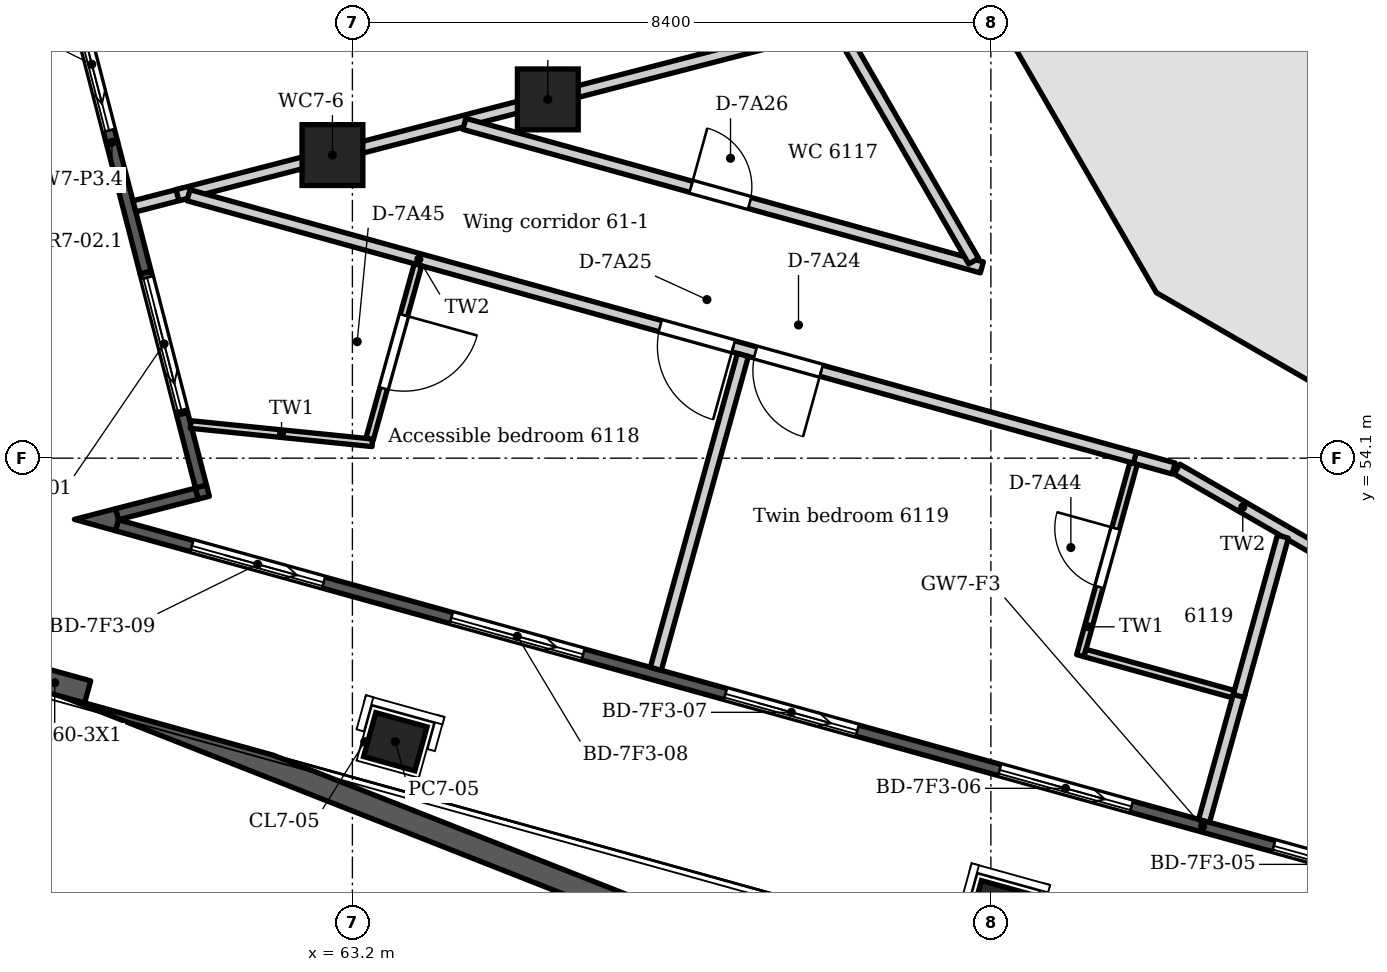
"""IFC4 building model, lengths in metres.
Left out: names, types, materials, properties, quantities, classifications, styles, units other than length and angle.
Written with IfcOpenShell. Run it as: python <this file> out.ifc"""

import sys

from ifc_helpers import new_model, si_unit, direction, frame, frame_2d, origin, origin_2d, place, context, subcontext, project, spatial, polyline, rectangle, circle, outline, extrude, element, fill, save


model = new_model("IFC4")
c1 = context("Model", 3, precision=1e-05, world=origin(), true_north=direction((0.0, 1.0)))
c2 = subcontext(c1, "Body", "Model", "MODEL_VIEW")
j1 = project(units=[si_unit("LENGTHUNIT", "METRE"), si_unit("PLANEANGLEUNIT", "RADIAN")], contexts=[c1])
p1 = place(None, origin())
s1 = spatial("IfcSite", under=j1, at=p1, CompositionType="ELEMENT")
p2 = place(p1, origin())
s2 = spatial("IfcBuilding", under=s1, at=p2, CompositionType="ELEMENT")
p3 = place(p2, frame((0.0, 0.0, 234.9)))
s3 = spatial("IfcBuildingStorey", under=s2, at=p3, CompositionType="ELEMENT", Elevation=234.9)
p4 = place(p3, frame((71.803, 60.397, 0.0), z_axis=(0.0, 0.0, 1.0), x_axis=(0.499983800959, -0.866034756103, 0.0)))
e1 = element("IfcWall", 1, at=p4, inside=s3, PredefinedType="SHEAR", context=c2, shape_type="SweptSolid", body=[
    extrude(outline(polyline([(0.0, -0.35), (4.555, -0.35), (4.368, 0.35), (0.188, 0.35), (0.0, -0.35)])), origin(), (0.0, 0.0, 1.0), 3.6),
])
p5 = place(p4, frame((1.577, 0.0, 0.0)))
e2 = element("IfcOpeningElement", 2, at=p5, cuts=e1, PredefinedType="OPENING", context=c2, shape_type="SweptSolid", body=[
    extrude(rectangle(XDim=1.4, YDim=2.1, at=frame_2d((0.7, 1.05))), frame((0.0, 0.36, 0.0), z_axis=(0.0, -1.0, 0.0), x_axis=(1.0, 0.0, 0.0)), (0.0, 0.0, 1.0), 0.72),
])
p6 = place(p3, frame((73.952, 56.581, 0.0), z_axis=(0.0, 0.0, 1.0), x_axis=(0.866034756103, -0.499983800959, 0.0)))
e3 = element("IfcWall", 3, at=p6, inside=s3, PredefinedType="SHEAR", context=c2, shape_type="SweptSolid", body=[
    extrude(outline(polyline([(0.0, -0.35), (4.555, -0.35), (4.368, 0.35), (0.188, 0.35), (0.0, -0.35)])), origin(), (0.0, 0.0, 1.0), 3.6),
])
p7 = place(p3, frame((80.354, 60.886, 0.0), z_axis=(0.0, 0.0, 1.0), x_axis=(-0.866032430508, -0.49998782916, 0.0)))
e4 = element("IfcWall", 4, at=p7, inside=s3, PredefinedType="SHEAR", context=c2, shape_type="SweptSolid", body=[
    extrude(rectangle(XDim=7.3, YDim=0.3, at=frame_2d((3.65, 0.0))), origin(), (0.0, 0.0, 1.0), 3.6),
])
for number, where, z_axis, x_axis in (
    (5, (71.733, 48.16, -0.35), (0.0, 0.0, 1.0), (-0.964, 0.267, 0.0)),
    (6, (63.765, 50.37, -0.35), (0.0, 0.0, 1.0), (-0.964, 0.267, 0.0)),
):
    element("IfcColumn", number, at=place(p3, frame(where, z_axis=z_axis, x_axis=x_axis)), inside=s3, PredefinedType="COLUMN", context=c2, shape_type="SweptSolid", body=[
        extrude(rectangle(XDim=0.7, YDim=0.6, at=origin_2d()), origin(), (0.0, 0.0, 1.0), 3.95),
    ])
for number, where, z_axis, x_axis in (
    (7, (65.771, 58.82, -0.35), (0.0, 0.0, 1.0), (1.0, 0.0, 0.0)),
    (8, (62.938, 58.087, -0.35), (0.0, 0.0, 1.0), (1.0, 0.0, 0.0)),
):
    element("IfcColumn", number, at=place(p3, frame(where, z_axis=z_axis, x_axis=x_axis)), inside=s3, PredefinedType="COLUMN", context=c2, shape_type="SweptSolid", body=[
        extrude(circle(Radius=0.4, at=origin_2d()), origin(), (0.0, 0.0, 1.0), 3.95),
    ])
p8 = place(p3, frame((92.419, 44.255, 0.0), z_axis=(0.0, 0.0, 1.0), x_axis=(-0.963630586427, 0.267237895708, 0.0)))
e9 = element("IfcWall", 9, at=p8, inside=s3, PredefinedType="SOLIDWALL", context=c2, shape_type="SweptSolid", body=[
    extrude(outline(polyline([(0.149, 0.075), (0.149, -0.075), (33.537, -0.075), (33.537, 0.075), (0.149, 0.075)])), origin(), (0.0, 0.0, 1.0), 3.3),
])
p9 = place(p8, frame((1.171, 0.0, 0.0)))
e10 = element("IfcOpeningElement", 10, at=p9, cuts=e9, PredefinedType="OPENING", context=c2, shape_type="SweptSolid", body=[
    extrude(rectangle(XDim=1.8, YDim=2.6, at=frame_2d((0.9, 1.3))), frame((0.0, 0.085, 0.0), z_axis=(0.0, -1.0, 0.0), x_axis=(1.0, 0.0, 0.0)), (0.0, 0.0, 1.0), 0.17),
])
p10 = place(p8, frame((4.714, 0.0, 0.0)))
e11 = element("IfcOpeningElement", 11, at=p10, cuts=e9, PredefinedType="OPENING", context=c2, shape_type="SweptSolid", body=[
    extrude(rectangle(XDim=1.8, YDim=2.6, at=frame_2d((0.9, 1.3))), frame((0.0, 0.085, 0.0), z_axis=(0.0, -1.0, 0.0), x_axis=(1.0, 0.0, 0.0)), (0.0, 0.0, 1.0), 0.17),
])
p11 = place(p8, frame((8.457, 0.0, 0.0)))
e12 = element("IfcOpeningElement", 12, at=p11, cuts=e9, PredefinedType="OPENING", context=c2, shape_type="SweptSolid", body=[
    extrude(rectangle(XDim=1.8, YDim=2.6, at=frame_2d((0.9, 1.3))), frame((0.0, 0.085, 0.0), z_axis=(0.0, -1.0, 0.0), x_axis=(1.0, 0.0, 0.0)), (0.0, 0.0, 1.0), 0.17),
])
p12 = place(p8, frame((12.2, 0.0, 0.0)))
e13 = element("IfcOpeningElement", 13, at=p12, cuts=e9, PredefinedType="OPENING", context=c2, shape_type="SweptSolid", body=[
    extrude(rectangle(XDim=1.8, YDim=2.6, at=frame_2d((0.9, 1.3))), frame((0.0, 0.085, 0.0), z_axis=(0.0, -1.0, 0.0), x_axis=(1.0, 0.0, 0.0)), (0.0, 0.0, 1.0), 0.17),
])
p13 = place(p8, frame((15.943, 0.0, 0.0)))
e14 = element("IfcOpeningElement", 14, at=p13, cuts=e9, PredefinedType="OPENING", context=c2, shape_type="SweptSolid", body=[
    extrude(rectangle(XDim=1.8, YDim=2.6, at=frame_2d((0.9, 1.3))), frame((0.0, 0.085, 0.0), z_axis=(0.0, -1.0, 0.0), x_axis=(1.0, 0.0, 0.0)), (0.0, 0.0, 1.0), 0.17),
])
p14 = place(p8, frame((19.686, 0.0, 0.0)))
e15 = element("IfcOpeningElement", 15, at=p14, cuts=e9, PredefinedType="OPENING", context=c2, shape_type="SweptSolid", body=[
    extrude(rectangle(XDim=1.8, YDim=2.6, at=frame_2d((0.9, 1.3))), frame((0.0, 0.085, 0.0), z_axis=(0.0, -1.0, 0.0), x_axis=(1.0, 0.0, 0.0)), (0.0, 0.0, 1.0), 0.17),
])
p15 = place(p8, frame((23.429, 0.0, 0.0)))
e16 = element("IfcOpeningElement", 16, at=p15, cuts=e9, PredefinedType="OPENING", context=c2, shape_type="SweptSolid", body=[
    extrude(rectangle(XDim=1.8, YDim=2.6, at=frame_2d((0.9, 1.3))), frame((0.0, 0.085, 0.0), z_axis=(0.0, -1.0, 0.0), x_axis=(1.0, 0.0, 0.0)), (0.0, 0.0, 1.0), 0.17),
])
p16 = place(p8, frame((27.172, 0.0, 0.0)))
e17 = element("IfcOpeningElement", 17, at=p16, cuts=e9, PredefinedType="OPENING", context=c2, shape_type="SweptSolid", body=[
    extrude(rectangle(XDim=1.8, YDim=2.6, at=frame_2d((0.9, 1.3))), frame((0.0, 0.085, 0.0), z_axis=(0.0, -1.0, 0.0), x_axis=(1.0, 0.0, 0.0)), (0.0, 0.0, 1.0), 0.17),
])
p17 = place(p8, frame((30.715, 0.0, 0.0)))
e18 = element("IfcOpeningElement", 18, at=p17, cuts=e9, PredefinedType="OPENING", context=c2, shape_type="SweptSolid", body=[
    extrude(rectangle(XDim=1.8, YDim=2.6, at=frame_2d((0.9, 1.3))), frame((0.0, 0.085, 0.0), z_axis=(0.0, -1.0, 0.0), x_axis=(1.0, 0.0, 0.0)), (0.0, 0.0, 1.0), 0.17),
])
p18 = place(p3, frame((59.958, 53.325, 0.0), z_axis=(0.0, 0.0, 1.0), x_axis=(0.968124150503, 0.250470815091, 0.0)))
e19 = element("IfcWall", 19, at=p18, inside=s3, PredefinedType="SOLIDWALL", context=c2, shape_type="SweptSolid", body=[
    extrude(outline(polyline([(0.149, 0.075), (0.149, -0.075), (1.235, -0.075), (1.235, 0.075), (0.149, 0.075)])), origin(), (0.0, 0.0, 1.0), 3.3),
])
p19 = place(p3, frame((61.236, 53.619, 0.0), z_axis=(0.0, 0.0, 1.0), x_axis=(-0.250361300835, 0.968152477167, 0.0)))
e20 = element("IfcWall", 20, at=p19, inside=s3, PredefinedType="SOLIDWALL", context=c2, shape_type="SweptSolid", body=[
    extrude(outline(polyline([(0.11, -0.075), (1.1, -0.075), (1.1, 0.075), (0.11, 0.075), (0.11, -0.075)])), origin(), (0.0, 0.0, 1.0), 3.3),
])
p20 = place(p3, frame((60.96, 54.684, 0.0), z_axis=(0.0, 0.0, 1.0), x_axis=(-0.250450586115, 0.968129383871, 0.0)))
e21 = element("IfcWall", 21, at=p20, inside=s3, PredefinedType="SOLIDWALL", context=c2, shape_type="SweptSolid", body=[
    extrude(outline(polyline([(0.0, -0.075), (1.921, -0.075), (1.921, 0.075), (0.0, 0.075), (0.0, -0.075)])), origin(), (0.0, 0.0, 1.0), 2.75),
])
p21 = place(p20, frame((0.05, 0.0, 0.0)))
e22 = element("IfcOpeningElement", 22, at=p21, cuts=e21, PredefinedType="OPENING", context=c2, shape_type="SweptSolid", body=[
    extrude(rectangle(XDim=1.8, YDim=2.6, at=frame_2d((0.9, 1.3))), frame((0.0, 0.085, 0.0), z_axis=(0.0, -1.0, 0.0), x_axis=(1.0, 0.0, 0.0)), (0.0, 0.0, 1.0), 0.17),
])
p22 = place(p3, frame((60.479, 56.544, 0.0), z_axis=(0.0, 0.0, 1.0), x_axis=(-0.250373840462, 0.968149234371, 0.0)))
e23 = element("IfcWall", 23, at=p22, inside=s3, PredefinedType="SOLIDWALL", context=c2, shape_type="SweptSolid", body=[
    extrude(outline(polyline([(0.0, -0.075), (1.757, -0.075), (1.757, 0.075), (0.0, 0.075), (0.0, -0.075)])), origin(), (0.0, 0.0, 1.0), 3.3),
])
p23 = place(p3, frame((60.039, 58.245, 0.0), z_axis=(0.0, 0.0, 1.0), x_axis=(-0.250341838346, 0.968157509899, 0.0)))
e24 = element("IfcWall", 24, at=p23, inside=s3, PredefinedType="SOLIDWALL", context=c2, shape_type="SweptSolid", body=[
    extrude(outline(polyline([(0.0, -0.075), (2.021, -0.075), (2.021, 0.075), (0.0, 0.075), (0.0, -0.075)])), origin(), (0.0, 0.0, 1.0), 2.75),
])
p24 = place(p23, frame((0.171, 0.0, 0.0)))
e25 = element("IfcOpeningElement", 25, at=p24, cuts=e24, PredefinedType="OPENING", context=c2, shape_type="SweptSolid", body=[
    extrude(rectangle(XDim=1.8, YDim=2.6, at=frame_2d((0.9, 1.3))), frame((0.0, 0.085, 0.0), z_axis=(0.0, -1.0, 0.0), x_axis=(1.0, 0.0, 0.0)), (0.0, 0.0, 1.0), 0.17),
])
p25 = place(p3, origin())
e26 = element("IfcWall", 26, at=p25, inside=s3, PredefinedType="PARAPET", context=c2, shape_type="SweptSolid", body=[
    extrude(outline(polyline([(59.388, 50.961), (96.326, 36.411), (96.275, 36.753), (62.154, 50.194), (59.388, 50.961)])), origin(), (0.0, 0.0, 1.0), 1.1),
])
p26 = place(p3, origin())
e27 = element("IfcWall", 27, at=p26, inside=s3, PredefinedType="PARAPET", context=c2, shape_type="SweptSolid", body=[
    extrude(outline(polyline([(58.89, 51.41), (58.81, 51.121), (59.677, 50.881), (59.757, 51.17), (58.89, 51.41)])), origin(), (0.0, 0.0, 1.0), 1.1),
])
p27 = place(p3, frame((60.332, 57.413, 0.0), z_axis=(0.0, 0.0, 1.0), x_axis=(0.968209183311, 0.250141914426, 0.0)))
e28 = element("IfcWall", 28, at=p27, inside=s3, PredefinedType="PARTITIONING", context=c2, shape_type="SweptSolid", body=[
    extrude(rectangle(XDim=0.671, YDim=0.15, at=frame_2d((0.336, 0.0))), origin(), (0.0, 0.0, 1.0), 3.3),
])
p28 = place(p3, frame((60.898, 57.56, 0.0), z_axis=(0.0, 0.0, 1.0), x_axis=(0.968148722019, 0.250375821623, 0.0)))
e29 = element("IfcWall", 29, at=p28, inside=s3, PredefinedType="PARTITIONING", context=c2, shape_type="SweptSolid", body=[
    extrude(rectangle(XDim=9.018, YDim=0.15, at=frame_2d((4.509, 0.0))), origin(), (0.0, 0.0, 1.0), 2.75),
])
p29 = place(p3, frame((61.043, 57.559, 0.0), z_axis=(0.0, 0.0, 1.0), x_axis=(0.963630739332, -0.26723734435, 0.0)))
e30 = element("IfcWall", 30, at=p29, inside=s3, PredefinedType="PARTITIONING", context=c2, shape_type="SweptSolid", body=[
    extrude(rectangle(XDim=12.979, YDim=0.15, at=frame_2d((6.49, 0.0))), origin(), (0.0, 0.0, 1.0), 2.75),
])
p30 = place(p29, frame((7.74, 0.0, 0.0)))
e31 = element("IfcOpeningElement", 31, at=p30, cuts=e30, PredefinedType="OPENING", context=c2, shape_type="SweptSolid", body=[
    extrude(rectangle(XDim=0.9, YDim=2.1, at=frame_2d((0.45, 1.05))), frame((0.0, 0.085, 0.0), z_axis=(0.0, -1.0, 0.0), x_axis=(1.0, 0.0, 0.0)), (0.0, 0.0, 1.0), 0.17),
])
p31 = place(p29, frame((6.44, 0.0, 0.0)))
e32 = element("IfcOpeningElement", 32, at=p31, cuts=e30, PredefinedType="OPENING", context=c2, shape_type="SweptSolid", body=[
    extrude(rectangle(XDim=1.0, YDim=2.1, at=frame_2d((0.5, 1.05))), frame((0.0, 0.085, 0.0), z_axis=(0.0, -1.0, 0.0), x_axis=(1.0, 0.0, 0.0)), (0.0, 0.0, 1.0), 0.17),
])
p32 = place(p3, frame((61.072, 54.543, 0.0), z_axis=(0.0, 0.0, 1.0), x_axis=(0.994963516173, -0.100237724861, 0.0)))
e33 = element("IfcWall", 33, at=p32, inside=s3, PredefinedType="PARTITIONING", context=c2, shape_type="SweptSolid", body=[
    extrude(rectangle(XDim=2.404, YDim=0.1, at=frame_2d((1.202, 0.0))), origin(), (0.0, 0.0, 1.0), 3.3),
])
p33 = place(p3, frame((63.427, 54.355, 0.0), z_axis=(0.0, 0.0, 1.0), x_axis=(0.267177255804, 0.963647401273, 0.0)))
e34 = element("IfcWall", 34, at=p33, inside=s3, PredefinedType="PARTITIONING", context=c2, shape_type="SweptSolid", body=[
    extrude(rectangle(XDim=2.375, YDim=0.1, at=frame_2d((1.188, 0.0))), origin(), (0.0, 0.0, 1.0), 3.3),
])
p34 = place(p33, frame((0.688, 0.0, 0.0)))
e35 = element("IfcOpeningElement", 35, at=p34, cuts=e34, PredefinedType="OPENING", context=c2, shape_type="SweptSolid", body=[
    extrude(rectangle(XDim=1.0, YDim=2.1, at=frame_2d((0.5, 1.05))), frame((0.0, 0.06, 0.0), z_axis=(0.0, -1.0, 0.0), x_axis=(1.0, 0.0, 0.0)), (0.0, 0.0, 1.0), 0.12),
])
p35 = place(p3, frame((64.673, 58.498, 0.0), z_axis=(0.0, 0.0, 1.0), x_axis=(0.963632187737, -0.267232121491, 0.0)))
e36 = element("IfcWall", 36, at=p35, inside=s3, PredefinedType="PARTITIONING", context=c2, shape_type="SweptSolid", body=[
    extrude(rectangle(XDim=7.065, YDim=0.15, at=frame_2d((3.532, 0.0))), origin(), (0.0, 0.0, 1.0), 2.8),
])
p36 = place(p35, frame((3.095, 0.0, 0.0)))
e37 = element("IfcOpeningElement", 37, at=p36, cuts=e36, PredefinedType="OPENING", context=c2, shape_type="SweptSolid", body=[
    extrude(rectangle(XDim=0.8, YDim=2.1, at=frame_2d((0.4, 1.05))), frame((0.0, 0.085, 0.0), z_axis=(0.0, -1.0, 0.0), x_axis=(1.0, 0.0, 0.0)), (0.0, 0.0, 1.0), 0.17),
])
p37 = place(p3, frame((67.192, 51.329, 0.0), z_axis=(0.0, 0.0, 1.0), x_axis=(0.267270648008, 0.963621502828, 0.0)))
e38 = element("IfcWall", 38, at=p37, inside=s3, PredefinedType="PARTITIONING", context=c2, shape_type="SweptSolid", body=[
    extrude(rectangle(XDim=4.285, YDim=0.15, at=frame_2d((2.143, 0.0))), origin(), (0.0, 0.0, 1.0), 3.3),
])
p38 = place(p3, frame((69.625, 59.72, 0.0), z_axis=(0.0, 0.0, 1.0), x_axis=(0.50005889006, -0.865991400923, 0.0)))
e39 = element("IfcWall", 39, at=p38, inside=s3, PredefinedType="PARTITIONING", context=c2, shape_type="SweptSolid", body=[
    extrude(rectangle(XDim=3.497, YDim=0.15, at=frame_2d((1.748, 0.0))), origin(), (0.0, 0.0, 1.0), 2.8),
])
p39 = place(p3, frame((72.777, 51.502, 0.0), z_axis=(0.0, 0.0, 1.0), x_axis=(0.267159430854, 0.963652343175, 0.0)))
e40 = element("IfcWall", 40, at=p39, inside=s3, PredefinedType="PARTITIONING", context=c2, shape_type="SweptSolid", body=[
    extrude(rectangle(XDim=2.625, YDim=0.1, at=frame_2d((1.313, 0.0))), origin(), (0.0, 0.0, 1.0), 3.3),
])
p40 = place(p39, frame((0.938, 0.0, 0.0)))
e41 = element("IfcOpeningElement", 41, at=p40, cuts=e40, PredefinedType="OPENING", context=c2, shape_type="SweptSolid", body=[
    extrude(rectangle(XDim=0.8, YDim=2.1, at=frame_2d((0.4, 1.05))), frame((0.0, 0.06, 0.0), z_axis=(0.0, -1.0, 0.0), x_axis=(1.0, 0.0, 0.0)), (0.0, 0.0, 1.0), 0.12),
])
p41 = place(p3, frame((72.838, 51.537, 0.0), z_axis=(0.0, 0.0, 1.0), x_axis=(0.963721434873, -0.266910089668, 0.0)))
e42 = element("IfcWall", 42, at=p41, inside=s3, PredefinedType="PARTITIONING", context=c2, shape_type="SweptSolid", body=[
    extrude(rectangle(XDim=2.025, YDim=0.1, at=frame_2d((1.013, 0.0))), origin(), (0.0, 0.0, 1.0), 3.3),
])
p42 = place(p3, frame((73.495, 54.106, 0.0), z_axis=(0.0, 0.0, 1.0), x_axis=(0.963398829282, -0.268072183819, 0.0)))
e43 = element("IfcWall", 43, at=p42, inside=s3, PredefinedType="PARTITIONING", context=c2, shape_type="SweptSolid", body=[
    extrude(rectangle(XDim=0.529, YDim=0.15, at=frame_2d((0.265, 0.0))), origin(), (0.0, 0.0, 1.0), 3.3),
])
p43 = place(p3, frame((74.049, 53.956, 0.0), z_axis=(0.0, 0.0, 1.0), x_axis=(0.865974487503, -0.500088179218, 0.0)))
e44 = element("IfcWall", 44, at=p43, inside=s3, PredefinedType="PARTITIONING", context=c2, shape_type="SweptSolid", body=[
    extrude(rectangle(XDim=3.737, YDim=0.15, at=frame_2d((1.868, 0.0))), origin(), (0.0, 0.0, 1.0), 3.3),
])
p44 = place(p43, frame((2.147, 0.0, 0.0)))
e45 = element("IfcOpeningElement", 45, at=p44, cuts=e44, PredefinedType="OPENING", context=c2, shape_type="SweptSolid", body=[
    extrude(rectangle(XDim=1.0, YDim=2.1, at=frame_2d((0.5, 1.05))), frame((0.0, 0.085, 0.0), z_axis=(0.0, -1.0, 0.0), x_axis=(1.0, 0.0, 0.0)), (0.0, 0.0, 1.0), 0.17),
])
p45 = place(p3, frame((74.405, 49.329, 0.0), z_axis=(0.0, 0.0, 1.0), x_axis=(0.267401148385, 0.963585297648, 0.0)))
e46 = element("IfcWall", 46, at=p45, inside=s3, PredefinedType="PARTITIONING", context=c2, shape_type="SweptSolid", body=[
    extrude(rectangle(XDim=1.764, YDim=0.15, at=frame_2d((0.882, 0.0))), origin(), (0.0, 0.0, 1.0), 3.3),
])
p46 = place(p3, frame((74.861, 50.972, 0.0), z_axis=(0.0, 0.0, 1.0), x_axis=(0.267076384881, 0.963675362681, 0.0)))
e47 = element("IfcWall", 47, at=p46, inside=s3, PredefinedType="PARTITIONING", context=c2, shape_type="SweptSolid", body=[
    extrude(rectangle(XDim=2.175, YDim=0.15, at=frame_2d((1.087, 0.0))), origin(), (0.0, 0.0, 1.0), 3.3),
])
p47 = place(p13, origin())
e48 = element("IfcDoor", 48, at=p47, inside=s3, OperationType="SLIDING_TO_LEFT", PredefinedType="DOOR", context=c2, shape_type="SweptSolid", body=[
    extrude(rectangle(XDim=1.8, YDim=2.6, at=frame_2d((0.9, 1.3))), frame((0.0, 0.025, 0.0), z_axis=(0.0, -1.0, 0.0), x_axis=(1.0, 0.0, 0.0)), (0.0, 0.0, 1.0), 0.05),
])
fill(e14, e48)
p48 = place(p14, origin())
e49 = element("IfcDoor", 49, at=p48, inside=s3, OperationType="SLIDING_TO_LEFT", PredefinedType="DOOR", context=c2, shape_type="SweptSolid", body=[
    extrude(rectangle(XDim=1.8, YDim=2.6, at=frame_2d((0.9, 1.3))), frame((0.0, 0.025, 0.0), z_axis=(0.0, -1.0, 0.0), x_axis=(1.0, 0.0, 0.0)), (0.0, 0.0, 1.0), 0.05),
])
fill(e15, e49)
p49 = place(p15, origin())
e50 = element("IfcDoor", 50, at=p49, inside=s3, OperationType="SLIDING_TO_LEFT", PredefinedType="DOOR", context=c2, shape_type="SweptSolid", body=[
    extrude(rectangle(XDim=1.8, YDim=2.6, at=frame_2d((0.9, 1.3))), frame((0.0, 0.025, 0.0), z_axis=(0.0, -1.0, 0.0), x_axis=(1.0, 0.0, 0.0)), (0.0, 0.0, 1.0), 0.05),
])
fill(e16, e50)
p50 = place(p16, origin())
e51 = element("IfcDoor", 51, at=p50, inside=s3, OperationType="SLIDING_TO_LEFT", PredefinedType="DOOR", context=c2, shape_type="SweptSolid", body=[
    extrude(rectangle(XDim=1.8, YDim=2.6, at=frame_2d((0.9, 1.3))), frame((0.0, 0.025, 0.0), z_axis=(0.0, -1.0, 0.0), x_axis=(1.0, 0.0, 0.0)), (0.0, 0.0, 1.0), 0.05),
])
fill(e17, e51)
p51 = place(p17, origin())
e52 = element("IfcDoor", 52, at=p51, inside=s3, OperationType="SLIDING_TO_LEFT", PredefinedType="DOOR", context=c2, shape_type="SweptSolid", body=[
    extrude(rectangle(XDim=1.8, YDim=2.6, at=frame_2d((0.9, 1.3))), frame((0.0, 0.025, 0.0), z_axis=(0.0, -1.0, 0.0), x_axis=(1.0, 0.0, 0.0)), (0.0, 0.0, 1.0), 0.05),
])
fill(e18, e52)
p52 = place(p21, origin())
e53 = element("IfcDoor", 53, at=p52, inside=s3, OperationType="SLIDING_TO_LEFT", PredefinedType="DOOR", context=c2, shape_type="SweptSolid", body=[
    extrude(rectangle(XDim=1.8, YDim=2.6, at=frame_2d((0.9, 1.3))), frame((0.0, 0.025, 0.0), z_axis=(0.0, -1.0, 0.0), x_axis=(1.0, 0.0, 0.0)), (0.0, 0.0, 1.0), 0.05),
])
fill(e22, e53)
p53 = place(p24, origin())
e54 = element("IfcDoor", 54, at=p53, inside=s3, OperationType="SLIDING_TO_LEFT", PredefinedType="DOOR", context=c2, shape_type="SweptSolid", body=[
    extrude(rectangle(XDim=1.8, YDim=2.6, at=frame_2d((0.9, 1.3))), frame((0.0, 0.025, 0.0), z_axis=(0.0, -1.0, 0.0), x_axis=(1.0, 0.0, 0.0)), (0.0, 0.0, 1.0), 0.05),
])
fill(e25, e54)
p54 = place(p30, frame((0.9, 0.0, 0.0), z_axis=(0.0, 0.0, 1.0), x_axis=(-1.0, 0.0, 0.0)))
e55 = element("IfcDoor", 55, at=p54, inside=s3, OperationType="SINGLE_SWING_LEFT", PredefinedType="DOOR", context=c2, shape_type="SweptSolid", body=[
    extrude(rectangle(XDim=0.9, YDim=2.1, at=frame_2d((0.45, 1.05))), frame((0.0, 0.025, 0.0), z_axis=(0.0, -1.0, 0.0), x_axis=(1.0, 0.0, 0.0)), (0.0, 0.0, 1.0), 0.05),
])
fill(e31, e55)
p55 = place(p31, frame((1.0, 0.0, 0.0), z_axis=(0.0, 0.0, 1.0), x_axis=(-1.0, 0.0, 0.0)))
e56 = element("IfcDoor", 56, at=p55, inside=s3, OperationType="SINGLE_SWING_LEFT", PredefinedType="DOOR", context=c2, shape_type="SweptSolid", body=[
    extrude(rectangle(XDim=1.0, YDim=2.1, at=frame_2d((0.5, 1.05))), frame((0.0, 0.025, 0.0), z_axis=(0.0, -1.0, 0.0), x_axis=(1.0, 0.0, 0.0)), (0.0, 0.0, 1.0), 0.05),
])
fill(e32, e56)
p56 = place(p36, origin())
e57 = element("IfcDoor", 57, at=p56, inside=s3, OperationType="SINGLE_SWING_LEFT", PredefinedType="DOOR", context=c2, shape_type="SweptSolid", body=[
    extrude(rectangle(XDim=0.8, YDim=2.1, at=frame_2d((0.4, 1.05))), frame((0.0, 0.025, 0.0), z_axis=(0.0, -1.0, 0.0), x_axis=(1.0, 0.0, 0.0)), (0.0, 0.0, 1.0), 0.05),
])
fill(e37, e57)
p57 = place(p40, origin())
e58 = element("IfcDoor", 58, at=p57, inside=s3, OperationType="SINGLE_SWING_RIGHT", PredefinedType="DOOR", context=c2, shape_type="SweptSolid", body=[
    extrude(rectangle(XDim=0.8, YDim=2.1, at=frame_2d((0.4, 1.05))), frame((0.0, 0.025, 0.0), z_axis=(0.0, -1.0, 0.0), x_axis=(1.0, 0.0, 0.0)), (0.0, 0.0, 1.0), 0.05),
])
fill(e41, e58)
p58 = place(p34, frame((1.0, 0.0, 0.0), z_axis=(0.0, 0.0, 1.0), x_axis=(-1.0, 0.0, 0.0)))
e59 = element("IfcDoor", 59, at=p58, inside=s3, OperationType="SINGLE_SWING_LEFT", PredefinedType="DOOR", context=c2, shape_type="SweptSolid", body=[
    extrude(rectangle(XDim=1.0, YDim=2.1, at=frame_2d((0.5, 1.05))), frame((0.0, 0.025, 0.0), z_axis=(0.0, -1.0, 0.0), x_axis=(1.0, 0.0, 0.0)), (0.0, 0.0, 1.0), 0.05),
])
fill(e35, e59)
p59 = place(p5, origin())
e60 = element("IfcDoor", 60, at=p59, inside=s3, OperationType="DOUBLE_DOOR_SINGLE_SWING", PredefinedType="DOOR", context=c2, shape_type="SweptSolid", body=[
    extrude(rectangle(XDim=1.4, YDim=2.1, at=frame_2d((0.7, 1.05))), frame((0.0, 0.025, 0.0), z_axis=(0.0, -1.0, 0.0), x_axis=(1.0, 0.0, 0.0)), (0.0, 0.0, 1.0), 0.05),
])
fill(e2, e60)
save(model, sys.argv[1])
